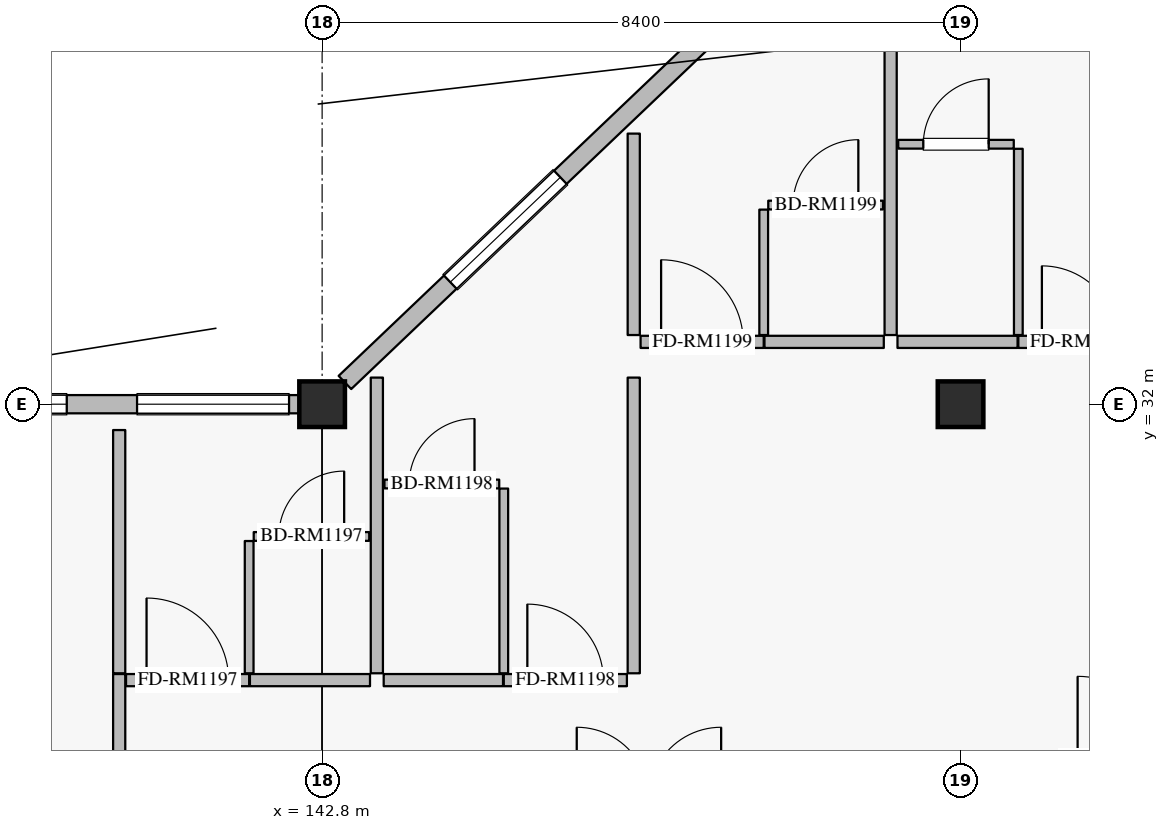
"""IFC4 building model, lengths in metres.
Left out: names, types, materials, properties, quantities, classifications, styles, units other than length and angle.
Written with IfcOpenShell. Run it as: python <this file> out.ifc"""

import sys

from ifc_helpers import new_model, si_unit, direction, frame, frame_2d, origin, origin_2d, place, context, subcontext, project, spatial, rectangle, extrude, element, fill, save


model = new_model("IFC4")
c1 = context("Model", 3, precision=1e-05, world=origin(), true_north=direction((0.0, 1.0)))
c2 = subcontext(c1, "Body", "Model", "MODEL_VIEW")
j1 = project(units=[si_unit("LENGTHUNIT", "METRE"), si_unit("PLANEANGLEUNIT", "RADIAN")], contexts=[c1])
p1 = place(None, origin())
s1 = spatial("IfcSite", under=j1, at=p1, CompositionType="ELEMENT")
p2 = place(p1, origin())
s2 = spatial("IfcBuilding", under=s1, at=p2, CompositionType="ELEMENT")
p3 = place(p2, frame((0.0, 0.0, 43.2)))
s3 = spatial("IfcBuildingStorey", under=s2, at=p3, CompositionType="ELEMENT", Elevation=43.2)
for number, where, z_axis, x_axis in (
    (1, (142.8, 32.0, 0.0), (0.0, 0.0, 1.0), (1.0, 0.0, 0.0)),
    (2, (151.2, 32.0, 0.0), (0.0, 0.0, 1.0), (1.0, 0.0, 0.0)),
):
    element("IfcColumn", number, at=place(p3, frame(where, z_axis=z_axis, x_axis=x_axis)), inside=s3, PredefinedType="COLUMN", context=c2, shape_type="SweptSolid", body=[
        extrude(rectangle(XDim=0.6, YDim=0.6, at=origin_2d()), origin(), (0.0, 0.0, 1.0), 4.2),
    ])
p4 = place(p3, frame((134.7, 32.0, 0.0), z_axis=(0.0, 0.0, 1.0), x_axis=(1.0, 0.0, 0.0)))
e3 = element("IfcWall", 3, at=p4, inside=s3, PredefinedType="SOLIDWALL", context=c2, shape_type="SweptSolid", body=[
    extrude(rectangle(XDim=7.8, YDim=0.24, at=frame_2d((3.9, 0.0))), origin(), (0.0, 0.0, 1.0), 3.54),
])
p5 = place(p4, frame((0.175, 0.0, 0.8)))
e4 = element("IfcOpeningElement", 4, at=p5, cuts=e3, PredefinedType="OPENING", context=c2, shape_type="SweptSolid", body=[
    extrude(rectangle(XDim=1.6, YDim=1.6, at=frame_2d((0.8, 0.8))), frame((0.0, 0.13, 0.0), z_axis=(0.0, -1.0, 0.0), x_axis=(1.0, 0.0, 0.0)), (0.0, 0.0, 1.0), 0.26),
])
p6 = place(p4, frame((2.74, 0.0, 0.8)))
e5 = element("IfcOpeningElement", 5, at=p6, cuts=e3, PredefinedType="OPENING", context=c2, shape_type="SweptSolid", body=[
    extrude(rectangle(XDim=2.0, YDim=1.75, at=frame_2d((1.0, 0.875))), frame((0.0, 0.13, 0.0), z_axis=(0.0, -1.0, 0.0), x_axis=(1.0, 0.0, 0.0)), (0.0, 0.0, 1.0), 0.26),
])
p7 = place(p4, frame((5.665, 0.0, 0.8)))
e6 = element("IfcOpeningElement", 6, at=p7, cuts=e3, PredefinedType="OPENING", context=c2, shape_type="SweptSolid", body=[
    extrude(rectangle(XDim=2.0, YDim=1.75, at=frame_2d((1.0, 0.875))), frame((0.0, 0.13, 0.0), z_axis=(0.0, -1.0, 0.0), x_axis=(1.0, 0.0, 0.0)), (0.0, 0.0, 1.0), 0.26),
])
p8 = place(p3, frame((143.1, 32.286, 0.0), z_axis=(0.0, 0.0, 1.0), x_axis=(0.724145477467, 0.689647248573, 0.0)))
e7 = element("IfcWall", 7, at=p8, inside=s3, PredefinedType="SOLIDWALL", context=c2, shape_type="SweptSolid", body=[
    extrude(rectangle(XDim=10.771, YDim=0.24, at=frame_2d((5.385, 0.0))), origin(), (0.0, 0.0, 1.0), 3.54),
])
p9 = place(p8, frame((1.914, 0.0, 0.8)))
e8 = element("IfcOpeningElement", 8, at=p9, cuts=e7, PredefinedType="OPENING", context=c2, shape_type="SweptSolid", body=[
    extrude(rectangle(XDim=2.0, YDim=1.75, at=frame_2d((1.0, 0.875))), frame((0.0, 0.13, 0.0), z_axis=(0.0, -1.0, 0.0), x_axis=(1.0, 0.0, 0.0)), (0.0, 0.0, 1.0), 0.26),
])
p10 = place(p8, frame((6.581, 0.0, 0.8)))
e9 = element("IfcOpeningElement", 9, at=p10, cuts=e7, PredefinedType="OPENING", context=c2, shape_type="SweptSolid", body=[
    extrude(rectangle(XDim=2.0, YDim=1.75, at=frame_2d((1.0, 0.875))), frame((0.0, 0.13, 0.0), z_axis=(0.0, -1.0, 0.0), x_axis=(1.0, 0.0, 0.0)), (0.0, 0.0, 1.0), 0.26),
])
p11 = place(p3, frame((140.13, 25.06, 0.0), z_axis=(0.0, 0.0, 1.0), x_axis=(0.0, 1.0, 0.0)))
e10 = element("IfcWall", 10, at=p11, inside=s3, PredefinedType="PARTITIONING", context=c2, shape_type="SweptSolid", body=[
    extrude(rectangle(XDim=3.39, YDim=0.16, at=frame_2d((1.695, 0.0))), origin(), (0.0, 0.0, 1.0), 3.935),
])
p12 = place(p3, frame((140.22, 28.37, 0.0), z_axis=(0.0, 0.0, 1.0), x_axis=(1.0, 0.0, 0.0)))
e11 = element("IfcWall", 11, at=p12, inside=s3, PredefinedType="PARTITIONING", context=c2, shape_type="SweptSolid", body=[
    extrude(rectangle(XDim=1.62, YDim=0.16, at=frame_2d((0.81, 0.0))), origin(), (0.0, 0.0, 1.0), 3.935),
])
p13 = place(p12, frame((0.27, 0.0, 0.0)))
e12 = element("IfcOpeningElement", 12, at=p13, cuts=e11, PredefinedType="OPENING", context=c2, shape_type="SweptSolid", body=[
    extrude(rectangle(XDim=1.08, YDim=2.3, at=frame_2d((0.54, 1.15))), frame((0.0, 0.09, 0.0), z_axis=(0.0, -1.0, 0.0), x_axis=(1.0, 0.0, 0.0)), (0.0, 0.0, 1.0), 0.18),
])
p14 = place(p3, frame((141.85, 28.37, 0.0), z_axis=(0.0, 0.0, 1.0), x_axis=(1.0, 0.0, 0.0)))
e13 = element("IfcWall", 13, at=p14, inside=s3, PredefinedType="PARTITIONING", context=c2, shape_type="SweptSolid", body=[
    extrude(rectangle(XDim=1.58, YDim=0.16, at=frame_2d((0.79, 0.0))), origin(), (0.0, 0.0, 1.0), 3.935),
])
p15 = place(p3, frame((141.84, 28.46, 0.0), z_axis=(0.0, 0.0, 1.0), x_axis=(0.0, 1.0, 0.0)))
e14 = element("IfcWall", 14, at=p15, inside=s3, PredefinedType="PARTITIONING", context=c2, shape_type="SweptSolid", body=[
    extrude(rectangle(XDim=1.74, YDim=0.115, at=frame_2d((0.87, 0.0))), origin(), (0.0, 0.0, 1.0), 3.935),
])
p16 = place(p3, frame((141.9, 30.26, 0.0), z_axis=(0.0, 0.0, 1.0), x_axis=(1.0, 0.0, 0.0)))
e15 = element("IfcWall", 15, at=p16, inside=s3, PredefinedType="PARTITIONING", context=c2, shape_type="SweptSolid", body=[
    extrude(rectangle(XDim=1.52, YDim=0.115, at=frame_2d((0.76, 0.0))), origin(), (0.0, 0.0, 1.0), 3.935),
])
p17 = place(p16, frame((0.33, 0.0, 0.0)))
e16 = element("IfcOpeningElement", 16, at=p17, cuts=e15, PredefinedType="OPENING", context=c2, shape_type="SweptSolid", body=[
    extrude(rectangle(XDim=0.86, YDim=2.12, at=frame_2d((0.43, 1.06))), frame((0.0, 0.067, 0.0), z_axis=(0.0, -1.0, 0.0), x_axis=(1.0, 0.0, 0.0)), (0.0, 0.0, 1.0), 0.135),
])
p18 = place(p3, frame((140.13, 28.46, 0.0), z_axis=(0.0, 0.0, 1.0), x_axis=(0.0, 1.0, 0.0)))
e17 = element("IfcWall", 17, at=p18, inside=s3, PredefinedType="PARTITIONING", context=c2, shape_type="SweptSolid", body=[
    extrude(rectangle(XDim=3.2, YDim=0.16, at=frame_2d((1.6, 0.0))), origin(), (0.0, 0.0, 1.0), 3.935),
])
p19 = place(p3, frame((143.61, 28.37, 0.0), z_axis=(0.0, 0.0, 1.0), x_axis=(1.0, 0.0, 0.0)))
e18 = element("IfcWall", 18, at=p19, inside=s3, PredefinedType="PARTITIONING", context=c2, shape_type="SweptSolid", body=[
    extrude(rectangle(XDim=1.57, YDim=0.16, at=frame_2d((0.785, 0.0))), origin(), (0.0, 0.0, 1.0), 3.935),
])
p20 = place(p3, frame((145.19, 28.37, 0.0), z_axis=(0.0, 0.0, 1.0), x_axis=(1.0, 0.0, 0.0)))
e19 = element("IfcWall", 19, at=p20, inside=s3, PredefinedType="PARTITIONING", context=c2, shape_type="SweptSolid", body=[
    extrude(rectangle(XDim=1.62, YDim=0.16, at=frame_2d((0.81, 0.0))), origin(), (0.0, 0.0, 1.0), 3.935),
])
p21 = place(p20, frame((0.31, 0.0, 0.0)))
e20 = element("IfcOpeningElement", 20, at=p21, cuts=e19, PredefinedType="OPENING", context=c2, shape_type="SweptSolid", body=[
    extrude(rectangle(XDim=1.0, YDim=2.25, at=frame_2d((0.5, 1.125))), frame((0.0, 0.09, 0.0), z_axis=(0.0, -1.0, 0.0), x_axis=(1.0, 0.0, 0.0)), (0.0, 0.0, 1.0), 0.18),
])
p22 = place(p3, frame((145.19, 28.46, 0.0), z_axis=(0.0, 0.0, 1.0), x_axis=(0.0, 1.0, 0.0)))
e21 = element("IfcWall", 21, at=p22, inside=s3, PredefinedType="PARTITIONING", context=c2, shape_type="SweptSolid", body=[
    extrude(rectangle(XDim=2.43, YDim=0.115, at=frame_2d((1.215, 0.0))), origin(), (0.0, 0.0, 1.0), 3.935),
])
p23 = place(p3, frame((143.62, 30.95, 0.0), z_axis=(0.0, 0.0, 1.0), x_axis=(1.0, 0.0, 0.0)))
e22 = element("IfcWall", 22, at=p23, inside=s3, PredefinedType="PARTITIONING", context=c2, shape_type="SweptSolid", body=[
    extrude(rectangle(XDim=1.51, YDim=0.115, at=frame_2d((0.755, 0.0))), origin(), (0.0, 0.0, 1.0), 3.935),
])
p24 = place(p23, frame((0.325, 0.0, 0.0)))
e23 = element("IfcOpeningElement", 23, at=p24, cuts=e22, PredefinedType="OPENING", context=c2, shape_type="SweptSolid", body=[
    extrude(rectangle(XDim=0.86, YDim=2.12, at=frame_2d((0.43, 1.06))), frame((0.0, 0.067, 0.0), z_axis=(0.0, -1.0, 0.0), x_axis=(1.0, 0.0, 0.0)), (0.0, 0.0, 1.0), 0.135),
])
for number, where, z_axis, x_axis in (
    (24, (143.52, 28.46, 0.0), (0.0, 0.0, 1.0), (0.0, 1.0, 0.0)),
    (25, (146.9, 28.46, 0.0), (0.0, 0.0, 1.0), (0.0, 1.0, 0.0)),
):
    element("IfcWall", number, at=place(p3, frame(where, z_axis=z_axis, x_axis=x_axis)), inside=s3, PredefinedType="PARTITIONING", context=c2, shape_type="SweptSolid", body=[
        extrude(rectangle(XDim=3.89, YDim=0.16, at=frame_2d((1.945, 0.0))), origin(), (0.0, 0.0, 1.0), 3.935),
    ])
p25 = place(p3, frame((146.99, 32.82, 0.0), z_axis=(0.0, 0.0, 1.0), x_axis=(1.0, 0.0, 0.0)))
e26 = element("IfcWall", 26, at=p25, inside=s3, PredefinedType="PARTITIONING", context=c2, shape_type="SweptSolid", body=[
    extrude(rectangle(XDim=1.62, YDim=0.16, at=frame_2d((0.81, 0.0))), origin(), (0.0, 0.0, 1.0), 3.935),
])
p26 = place(p25, frame((0.27, 0.0, 0.0)))
e27 = element("IfcOpeningElement", 27, at=p26, cuts=e26, PredefinedType="OPENING", context=c2, shape_type="SweptSolid", body=[
    extrude(rectangle(XDim=1.08, YDim=2.3, at=frame_2d((0.54, 1.15))), frame((0.0, 0.09, 0.0), z_axis=(0.0, -1.0, 0.0), x_axis=(1.0, 0.0, 0.0)), (0.0, 0.0, 1.0), 0.18),
])
p27 = place(p3, frame((148.62, 32.82, 0.0), z_axis=(0.0, 0.0, 1.0), x_axis=(1.0, 0.0, 0.0)))
e28 = element("IfcWall", 28, at=p27, inside=s3, PredefinedType="PARTITIONING", context=c2, shape_type="SweptSolid", body=[
    extrude(rectangle(XDim=1.57, YDim=0.16, at=frame_2d((0.785, 0.0))), origin(), (0.0, 0.0, 1.0), 3.935),
])
p28 = place(p3, frame((148.61, 32.91, 0.0), z_axis=(0.0, 0.0, 1.0), x_axis=(0.0, 1.0, 0.0)))
e29 = element("IfcWall", 29, at=p28, inside=s3, PredefinedType="PARTITIONING", context=c2, shape_type="SweptSolid", body=[
    extrude(rectangle(XDim=1.65, YDim=0.115, at=frame_2d((0.825, 0.0))), origin(), (0.0, 0.0, 1.0), 3.935),
])
p29 = place(p3, frame((148.67, 34.62, 0.0), z_axis=(0.0, 0.0, 1.0), x_axis=(1.0, 0.0, 0.0)))
e30 = element("IfcWall", 30, at=p29, inside=s3, PredefinedType="PARTITIONING", context=c2, shape_type="SweptSolid", body=[
    extrude(rectangle(XDim=1.51, YDim=0.115, at=frame_2d((0.755, 0.0))), origin(), (0.0, 0.0, 1.0), 3.935),
])
p30 = place(p29, frame((0.325, 0.0, 0.0)))
e31 = element("IfcOpeningElement", 31, at=p30, cuts=e30, PredefinedType="OPENING", context=c2, shape_type="SweptSolid", body=[
    extrude(rectangle(XDim=0.86, YDim=2.12, at=frame_2d((0.43, 1.06))), frame((0.0, 0.067, 0.0), z_axis=(0.0, -1.0, 0.0), x_axis=(1.0, 0.0, 0.0)), (0.0, 0.0, 1.0), 0.135),
])
p31 = place(p3, frame((146.9, 32.91, 0.0), z_axis=(0.0, 0.0, 1.0), x_axis=(0.0, 1.0, 0.0)))
e32 = element("IfcWall", 32, at=p31, inside=s3, PredefinedType="PARTITIONING", context=c2, shape_type="SweptSolid", body=[
    extrude(rectangle(XDim=2.65, YDim=0.16, at=frame_2d((1.325, 0.0))), origin(), (0.0, 0.0, 1.0), 3.935),
])
p32 = place(p3, frame((150.37, 32.82, 0.0), z_axis=(0.0, 0.0, 1.0), x_axis=(1.0, 0.0, 0.0)))
e33 = element("IfcWall", 33, at=p32, inside=s3, PredefinedType="PARTITIONING", context=c2, shape_type="SweptSolid", body=[
    extrude(rectangle(XDim=1.58, YDim=0.16, at=frame_2d((0.79, 0.0))), origin(), (0.0, 0.0, 1.0), 3.935),
])
p33 = place(p3, frame((151.96, 32.82, 0.0), z_axis=(0.0, 0.0, 1.0), x_axis=(1.0, 0.0, 0.0)))
e34 = element("IfcWall", 34, at=p33, inside=s3, PredefinedType="PARTITIONING", context=c2, shape_type="SweptSolid", body=[
    extrude(rectangle(XDim=1.62, YDim=0.16, at=frame_2d((0.81, 0.0))), origin(), (0.0, 0.0, 1.0), 3.935),
])
p34 = place(p33, frame((0.31, 0.0, 0.0)))
e35 = element("IfcOpeningElement", 35, at=p34, cuts=e34, PredefinedType="OPENING", context=c2, shape_type="SweptSolid", body=[
    extrude(rectangle(XDim=1.0, YDim=2.25, at=frame_2d((0.5, 1.125))), frame((0.0, 0.09, 0.0), z_axis=(0.0, -1.0, 0.0), x_axis=(1.0, 0.0, 0.0)), (0.0, 0.0, 1.0), 0.18),
])
p35 = place(p3, frame((151.96, 32.91, 0.0), z_axis=(0.0, 0.0, 1.0), x_axis=(0.0, 1.0, 0.0)))
e36 = element("IfcWall", 36, at=p35, inside=s3, PredefinedType="PARTITIONING", context=c2, shape_type="SweptSolid", body=[
    extrude(rectangle(XDim=2.45, YDim=0.115, at=frame_2d((1.225, 0.0))), origin(), (0.0, 0.0, 1.0), 3.935),
])
p36 = place(p3, frame((150.38, 35.42, 0.0), z_axis=(0.0, 0.0, 1.0), x_axis=(1.0, 0.0, 0.0)))
e37 = element("IfcWall", 37, at=p36, inside=s3, PredefinedType="PARTITIONING", context=c2, shape_type="SweptSolid", body=[
    extrude(rectangle(XDim=1.52, YDim=0.115, at=frame_2d((0.76, 0.0))), origin(), (0.0, 0.0, 1.0), 3.935),
])
p37 = place(p36, frame((0.33, 0.0, 0.0)))
e38 = element("IfcOpeningElement", 38, at=p37, cuts=e37, PredefinedType="OPENING", context=c2, shape_type="SweptSolid", body=[
    extrude(rectangle(XDim=0.86, YDim=2.12, at=frame_2d((0.43, 1.06))), frame((0.0, 0.067, 0.0), z_axis=(0.0, -1.0, 0.0), x_axis=(1.0, 0.0, 0.0)), (0.0, 0.0, 1.0), 0.135),
])
p38 = place(p3, frame((150.28, 32.91, 0.0), z_axis=(0.0, 0.0, 1.0), x_axis=(0.0, 1.0, 0.0)))
e39 = element("IfcWall", 39, at=p38, inside=s3, PredefinedType="PARTITIONING", context=c2, shape_type="SweptSolid", body=[
    extrude(rectangle(XDim=5.87, YDim=0.16, at=frame_2d((2.935, 0.0))), origin(), (0.0, 0.0, 1.0), 3.935),
])
p39 = place(p6, origin())
e40 = element("IfcWindow", 40, at=p39, inside=s3, PartitioningType="DOUBLE_PANEL_VERTICAL", PredefinedType="WINDOW", context=c2, shape_type="SweptSolid", body=[
    extrude(rectangle(XDim=2.0, YDim=1.75, at=frame_2d((1.0, 0.875))), frame((0.0, 0.03, 0.0), z_axis=(0.0, -1.0, 0.0), x_axis=(1.0, 0.0, 0.0)), (0.0, 0.0, 1.0), 0.06),
])
fill(e5, e40)
p40 = place(p7, origin())
e41 = element("IfcWindow", 41, at=p40, inside=s3, PartitioningType="DOUBLE_PANEL_VERTICAL", PredefinedType="WINDOW", context=c2, shape_type="SweptSolid", body=[
    extrude(rectangle(XDim=2.0, YDim=1.75, at=frame_2d((1.0, 0.875))), frame((0.0, 0.03, 0.0), z_axis=(0.0, -1.0, 0.0), x_axis=(1.0, 0.0, 0.0)), (0.0, 0.0, 1.0), 0.06),
])
fill(e6, e41)
p41 = place(p9, origin())
e42 = element("IfcWindow", 42, at=p41, inside=s3, PartitioningType="DOUBLE_PANEL_VERTICAL", PredefinedType="WINDOW", context=c2, shape_type="SweptSolid", body=[
    extrude(rectangle(XDim=2.0, YDim=1.75, at=frame_2d((1.0, 0.875))), frame((0.0, 0.03, 0.0), z_axis=(0.0, -1.0, 0.0), x_axis=(1.0, 0.0, 0.0)), (0.0, 0.0, 1.0), 0.06),
])
fill(e8, e42)
p42 = place(p13, origin())
e43 = element("IfcDoor", 43, at=p42, inside=s3, OperationType="SINGLE_SWING_LEFT", PredefinedType="DOOR", context=c2, shape_type="SweptSolid", body=[
    extrude(rectangle(XDim=1.08, YDim=2.3, at=frame_2d((0.54, 1.15))), frame((0.0, 0.025, 0.0), z_axis=(0.0, -1.0, 0.0), x_axis=(1.0, 0.0, 0.0)), (0.0, 0.0, 1.0), 0.05),
])
fill(e12, e43)
p43 = place(p17, origin())
e44 = element("IfcDoor", 44, at=p43, inside=s3, OperationType="SINGLE_SWING_RIGHT", PredefinedType="DOOR", context=c2, shape_type="SweptSolid", body=[
    extrude(rectangle(XDim=0.86, YDim=2.12, at=frame_2d((0.43, 1.06))), frame((0.0, 0.025, 0.0), z_axis=(0.0, -1.0, 0.0), x_axis=(1.0, 0.0, 0.0)), (0.0, 0.0, 1.0), 0.05),
])
fill(e16, e44)
p44 = place(p21, origin())
e45 = element("IfcDoor", 45, at=p44, inside=s3, OperationType="SINGLE_SWING_LEFT", PredefinedType="DOOR", context=c2, shape_type="SweptSolid", body=[
    extrude(rectangle(XDim=1.0, YDim=2.25, at=frame_2d((0.5, 1.125))), frame((0.0, 0.025, 0.0), z_axis=(0.0, -1.0, 0.0), x_axis=(1.0, 0.0, 0.0)), (0.0, 0.0, 1.0), 0.05),
])
fill(e20, e45)
p45 = place(p24, origin())
e46 = element("IfcDoor", 46, at=p45, inside=s3, OperationType="SINGLE_SWING_RIGHT", PredefinedType="DOOR", context=c2, shape_type="SweptSolid", body=[
    extrude(rectangle(XDim=0.86, YDim=2.12, at=frame_2d((0.43, 1.06))), frame((0.0, 0.025, 0.0), z_axis=(0.0, -1.0, 0.0), x_axis=(1.0, 0.0, 0.0)), (0.0, 0.0, 1.0), 0.05),
])
fill(e23, e46)
p46 = place(p26, origin())
e47 = element("IfcDoor", 47, at=p46, inside=s3, OperationType="SINGLE_SWING_LEFT", PredefinedType="DOOR", context=c2, shape_type="SweptSolid", body=[
    extrude(rectangle(XDim=1.08, YDim=2.3, at=frame_2d((0.54, 1.15))), frame((0.0, 0.025, 0.0), z_axis=(0.0, -1.0, 0.0), x_axis=(1.0, 0.0, 0.0)), (0.0, 0.0, 1.0), 0.05),
])
fill(e27, e47)
p47 = place(p30, origin())
e48 = element("IfcDoor", 48, at=p47, inside=s3, OperationType="SINGLE_SWING_RIGHT", PredefinedType="DOOR", context=c2, shape_type="SweptSolid", body=[
    extrude(rectangle(XDim=0.86, YDim=2.12, at=frame_2d((0.43, 1.06))), frame((0.0, 0.025, 0.0), z_axis=(0.0, -1.0, 0.0), x_axis=(1.0, 0.0, 0.0)), (0.0, 0.0, 1.0), 0.05),
])
fill(e31, e48)
p48 = place(p34, origin())
e49 = element("IfcDoor", 49, at=p48, inside=s3, OperationType="SINGLE_SWING_LEFT", PredefinedType="DOOR", context=c2, shape_type="SweptSolid", body=[
    extrude(rectangle(XDim=1.0, YDim=2.25, at=frame_2d((0.5, 1.125))), frame((0.0, 0.025, 0.0), z_axis=(0.0, -1.0, 0.0), x_axis=(1.0, 0.0, 0.0)), (0.0, 0.0, 1.0), 0.05),
])
fill(e35, e49)
p49 = place(p37, origin())
e50 = element("IfcDoor", 50, at=p49, inside=s3, OperationType="SINGLE_SWING_RIGHT", PredefinedType="DOOR", context=c2, shape_type="SweptSolid", body=[
    extrude(rectangle(XDim=0.86, YDim=2.12, at=frame_2d((0.43, 1.06))), frame((0.0, 0.025, 0.0), z_axis=(0.0, -1.0, 0.0), x_axis=(1.0, 0.0, 0.0)), (0.0, 0.0, 1.0), 0.05),
])
fill(e38, e50)
save(model, sys.argv[1])
